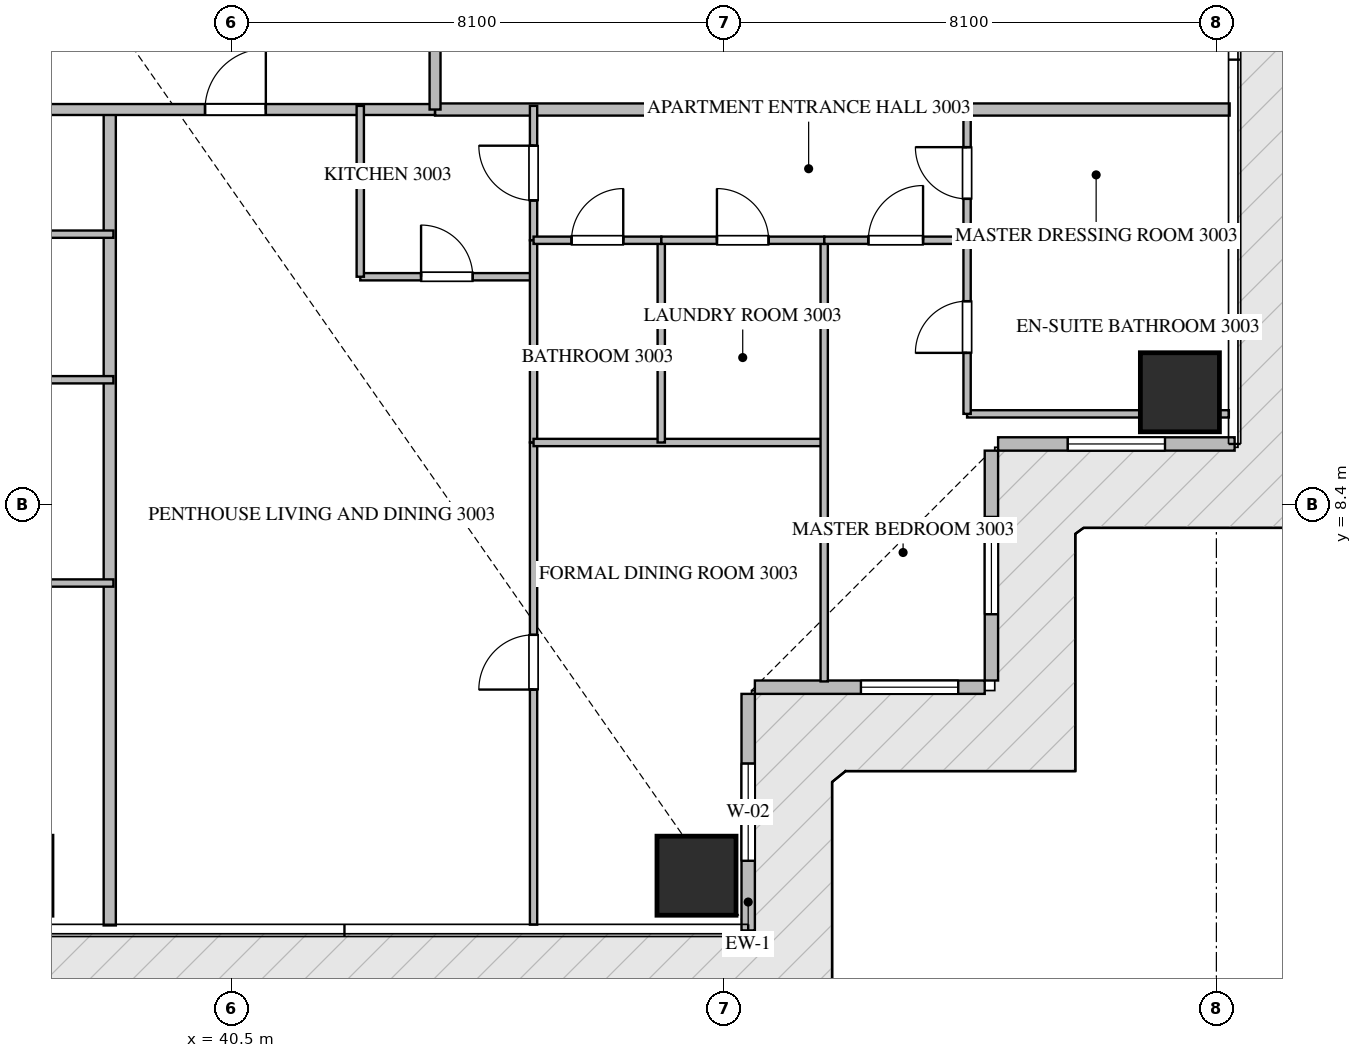
"""IFC4 building model, lengths in metres.
Left out: names, types, materials, properties, quantities, classifications, styles, units other than length and angle.
Written with IfcOpenShell. Run it as: python <this file> out.ifc"""

import sys

from ifc_helpers import new_model, si_unit, direction, frame, frame_2d, origin, origin_2d, place, context, subcontext, project, spatial, rectangle, extrude, source, transform, mapped, element, fill, save


model = new_model("IFC4")
c1 = context("Model", 3, precision=1e-05, world=origin(), true_north=direction((0.0, 1.0)))
c2 = subcontext(c1, "Body", "Model", "MODEL_VIEW")
j1 = project(units=[si_unit("LENGTHUNIT", "METRE"), si_unit("PLANEANGLEUNIT", "RADIAN")], contexts=[c1])
p1 = place(None, origin())
s1 = spatial("IfcSite", under=j1, at=p1, CompositionType="ELEMENT")
p2 = place(p1, origin())
s2 = spatial("IfcBuilding", under=s1, at=p2, CompositionType="ELEMENT")
p3 = place(p2, frame((0.0, 0.0, 123.9)))
s3 = spatial("IfcBuildingStorey", under=s2, at=p3, CompositionType="ELEMENT", Elevation=123.9)
m1 = source(origin(), c2, "Body", "SweptSolid", [
    extrude(rectangle(XDim=1.3, YDim=1.3, at=origin_2d()), origin(), (0.0, 0.0, 1.0), 3.75),
])
for number, where, z_axis, x_axis in (
    (1, (48.15, 2.3, -0.26), (0.0, 0.0, 1.0), (1.0, 0.0, 0.0)),
    (2, (56.1, 10.25, -0.26), (0.0, 0.0, 1.0), (1.0, 0.0, 0.0)),
):
    element("IfcColumn", number, at=place(p3, frame(where, z_axis=z_axis, x_axis=x_axis)), inside=s3, PredefinedType="COLUMN", context=c2, shape_type="MappedRepresentation", body=[
        mapped(m1, transform((0.0, 0.0, 0.0), scale=1.0)),
    ])
p4 = place(p3, frame((49.0, 1.4, 0.0), z_axis=(0.0, 0.0, 1.0), x_axis=(0.0, 1.0, 0.0)))
e3 = element("IfcWall", 3, at=p4, inside=s3, PredefinedType="ELEMENTEDWALL", context=c2, shape_type="SweptSolid", body=[
    extrude(rectangle(XDim=3.89, YDim=0.22, at=frame_2d((1.945, 0.0))), origin(), (0.0, 0.0, 1.0), 3.475),
])
p5 = place(p4, frame((1.145, 0.0, 0.65)))
e4 = element("IfcOpeningElement", 4, at=p5, cuts=e3, PredefinedType="OPENING", context=c2, shape_type="SweptSolid", body=[
    extrude(rectangle(XDim=1.6, YDim=2.1, at=frame_2d((0.8, 1.05))), frame((0.0, 0.12, 0.0), z_axis=(0.0, -1.0, 0.0), x_axis=(1.0, 0.0, 0.0)), (0.0, 0.0, 1.0), 0.24),
])
p6 = place(p3, frame((49.11, 5.4, 0.0), z_axis=(0.0, 0.0, 1.0), x_axis=(1.0, 0.0, 0.0)))
e5 = element("IfcWall", 5, at=p6, inside=s3, PredefinedType="ELEMENTEDWALL", context=c2, shape_type="SweptSolid", body=[
    extrude(rectangle(XDim=3.78, YDim=0.22, at=frame_2d((1.89, 0.0))), origin(), (0.0, 0.0, 1.0), 3.475),
])
p7 = place(p6, frame((1.744, 0.0, 0.65)))
e6 = element("IfcOpeningElement", 6, at=p7, cuts=e5, PredefinedType="OPENING", context=c2, shape_type="SweptSolid", body=[
    extrude(rectangle(XDim=1.6, YDim=2.1, at=frame_2d((0.8, 1.05))), frame((0.0, 0.12, 0.0), z_axis=(0.0, -1.0, 0.0), x_axis=(1.0, 0.0, 0.0)), (0.0, 0.0, 1.0), 0.24),
])
p8 = place(p3, frame((53.0, 5.51, 0.0), z_axis=(0.0, 0.0, 1.0), x_axis=(0.0, 1.0, 0.0)))
e7 = element("IfcWall", 7, at=p8, inside=s3, PredefinedType="ELEMENTEDWALL", context=c2, shape_type="SweptSolid", body=[
    extrude(rectangle(XDim=3.78, YDim=0.22, at=frame_2d((1.89, 0.0))), origin(), (0.0, 0.0, 1.0), 3.475),
])
p9 = place(p8, frame((1.09, 0.0, 0.65)))
e8 = element("IfcOpeningElement", 8, at=p9, cuts=e7, PredefinedType="OPENING", context=c2, shape_type="SweptSolid", body=[
    extrude(rectangle(XDim=1.6, YDim=2.1, at=frame_2d((0.8, 1.05))), frame((0.0, 0.12, 0.0), z_axis=(0.0, -1.0, 0.0), x_axis=(1.0, 0.0, 0.0)), (0.0, 0.0, 1.0), 0.24),
])
p10 = place(p3, frame((53.11, 9.4, 0.0), z_axis=(0.0, 0.0, 1.0), x_axis=(1.0, 0.0, 0.0)))
e9 = element("IfcWall", 9, at=p10, inside=s3, PredefinedType="ELEMENTEDWALL", context=c2, shape_type="SweptSolid", body=[
    extrude(rectangle(XDim=3.89, YDim=0.22, at=frame_2d((1.945, 0.0))), origin(), (0.0, 0.0, 1.0), 3.475),
])
p11 = place(p10, frame((1.145, 0.0, 0.65)))
e10 = element("IfcOpeningElement", 10, at=p11, cuts=e9, PredefinedType="OPENING", context=c2, shape_type="SweptSolid", body=[
    extrude(rectangle(XDim=1.6, YDim=2.1, at=frame_2d((0.8, 1.05))), frame((0.0, 0.12, 0.0), z_axis=(0.0, -1.0, 0.0), x_axis=(1.0, 0.0, 0.0)), (0.0, 0.0, 1.0), 0.24),
])
p12 = place(p3, frame((38.5, 1.482, 0.0), z_axis=(0.0, 0.0, 1.0), x_axis=(0.0, 1.0, 0.0)))
e11 = element("IfcWall", 11, at=p12, inside=s3, PredefinedType="PARTITIONING", context=c2, shape_type="SweptSolid", body=[
    extrude(rectangle(XDim=13.418, YDim=0.2, at=frame_2d((6.709, 0.0))), origin(), (0.0, 0.0, 1.0), 3.49),
])
p13 = place(p3, frame((43.85, 14.9, 0.0), z_axis=(0.0, 0.0, 1.0), x_axis=(1.0, 0.0, 0.0)))
e12 = element("IfcWall", 12, at=p13, inside=s3, PredefinedType="PARTITIONING", context=c2, shape_type="SweptSolid", body=[
    extrude(rectangle(XDim=13.068, YDim=0.2, at=frame_2d((6.534, 0.0))), origin(), (0.0, 0.0, 1.0), 3.49),
])
p14 = place(p3, frame((20.952, 14.9, 0.0), z_axis=(0.0, 0.0, 1.0), x_axis=(1.0, 0.0, 0.0)))
e13 = element("IfcWall", 13, at=p14, inside=s3, PredefinedType="PARTITIONING", context=c2, shape_type="SweptSolid", body=[
    extrude(rectangle(XDim=22.896, YDim=0.18, at=frame_2d((11.448, 0.0))), origin(), (0.0, 0.0, 1.0), 3.49),
])
p15 = place(p14, frame((2.781, 0.0, 0.0)))
e14 = element("IfcOpeningElement", 14, at=p15, cuts=e13, PredefinedType="OPENING", context=c2, shape_type="SweptSolid", body=[
    extrude(rectangle(XDim=1.0, YDim=2.15, at=frame_2d((0.5, 1.075))), frame((0.0, 0.1, 0.0), z_axis=(0.0, -1.0, 0.0), x_axis=(1.0, 0.0, 0.0)), (0.0, 0.0, 1.0), 0.2),
])
p16 = place(p14, frame((7.16, 0.0, 0.0)))
e15 = element("IfcOpeningElement", 15, at=p16, cuts=e13, PredefinedType="OPENING", context=c2, shape_type="SweptSolid", body=[
    extrude(rectangle(XDim=1.0, YDim=2.15, at=frame_2d((0.5, 1.075))), frame((0.0, 0.1, 0.0), z_axis=(0.0, -1.0, 0.0), x_axis=(1.0, 0.0, 0.0)), (0.0, 0.0, 1.0), 0.2),
])
p17 = place(p14, frame((19.115, 0.0, 0.0)))
e16 = element("IfcOpeningElement", 16, at=p17, cuts=e13, PredefinedType="OPENING", context=c2, shape_type="SweptSolid", body=[
    extrude(rectangle(XDim=1.0, YDim=2.15, at=frame_2d((0.5, 1.075))), frame((0.0, 0.1, 0.0), z_axis=(0.0, -1.0, 0.0), x_axis=(1.0, 0.0, 0.0)), (0.0, 0.0, 1.0), 0.2),
])
p18 = place(p3, frame((43.85, 14.9, 0.0), z_axis=(0.0, 0.0, 1.0), x_axis=(0.0, 1.0, 0.0)))
e17 = element("IfcWall", 17, at=p18, inside=s3, PredefinedType="PARTITIONING", context=c2, shape_type="SweptSolid", body=[
    extrude(rectangle(XDim=18.7, YDim=0.18, at=frame_2d((9.35, 0.0))), origin(), (0.0, 0.0, 1.0), 3.49),
])
p19 = place(p18, frame((1.805, 0.0, 0.0)))
e18 = element("IfcOpeningElement", 18, at=p19, cuts=e17, PredefinedType="OPENING", context=c2, shape_type="SweptSolid", body=[
    extrude(rectangle(XDim=1.0, YDim=2.15, at=frame_2d((0.5, 1.075))), frame((0.0, 0.1, 0.0), z_axis=(0.0, -1.0, 0.0), x_axis=(1.0, 0.0, 0.0)), (0.0, 0.0, 1.0), 0.2),
])
p20 = place(p18, frame((10.602, 0.0, 0.0)))
e19 = element("IfcOpeningElement", 19, at=p20, cuts=e17, PredefinedType="OPENING", context=c2, shape_type="SweptSolid", body=[
    extrude(rectangle(XDim=1.0, YDim=2.15, at=frame_2d((0.5, 1.075))), frame((0.0, 0.1, 0.0), z_axis=(0.0, -1.0, 0.0), x_axis=(1.0, 0.0, 0.0)), (0.0, 0.0, 1.0), 0.2),
])
p21 = place(p3, frame((30.94, 7.113, 0.0), z_axis=(0.0, 0.0, 1.0), x_axis=(1.0, 0.0, 0.0)))
e20 = element("IfcWall", 20, at=p21, inside=s3, PredefinedType="PARTITIONING", context=c2, shape_type="SweptSolid", body=[
    extrude(rectangle(XDim=7.62, YDim=0.12, at=frame_2d((3.81, 0.0))), origin(), (0.0, 0.0, 1.0), 3.49),
])
p22 = place(p3, frame((30.94, 10.456, 0.0), z_axis=(0.0, 0.0, 1.0), x_axis=(1.0, 0.0, 0.0)))
e21 = element("IfcWall", 21, at=p22, inside=s3, PredefinedType="PARTITIONING", context=c2, shape_type="SweptSolid", body=[
    extrude(rectangle(XDim=7.62, YDim=0.12, at=frame_2d((3.81, 0.0))), origin(), (0.0, 0.0, 1.0), 2.972),
])
p23 = place(p3, frame((30.94, 12.85, 0.0), z_axis=(0.0, 0.0, 1.0), x_axis=(1.0, 0.0, 0.0)))
e22 = element("IfcWall", 22, at=p23, inside=s3, PredefinedType="PARTITIONING", context=c2, shape_type="SweptSolid", body=[
    extrude(rectangle(XDim=7.62, YDim=0.12, at=frame_2d((3.81, 0.0))), origin(), (0.0, 0.0, 1.0), 3.49),
])
p24 = place(p3, frame((42.62, 12.15, 0.0), z_axis=(0.0, 0.0, 1.0), x_axis=(1.0, 0.0, 0.0)))
e23 = element("IfcWall", 23, at=p24, inside=s3, PredefinedType="PARTITIONING", context=c2, shape_type="SweptSolid", body=[
    extrude(rectangle(XDim=2.85, YDim=0.12, at=frame_2d((1.425, 0.0))), origin(), (0.0, 0.0, 1.0), 3.49),
])
p25 = place(p24, frame((1.0, 0.0, 0.0)))
e24 = element("IfcOpeningElement", 24, at=p25, cuts=e23, PredefinedType="OPENING", context=c2, shape_type="SweptSolid", body=[
    extrude(rectangle(XDim=0.85, YDim=2.1, at=frame_2d((0.425, 1.05))), frame((0.0, 0.07, 0.0), z_axis=(0.0, -1.0, 0.0), x_axis=(1.0, 0.0, 0.0)), (0.0, 0.0, 1.0), 0.14),
])
p26 = place(p3, frame((42.62, 12.15, 0.0), z_axis=(0.0, 0.0, 1.0), x_axis=(0.0, 1.0, 0.0)))
e25 = element("IfcWall", 25, at=p26, inside=s3, PredefinedType="PARTITIONING", context=c2, shape_type="SweptSolid", body=[
    extrude(rectangle(XDim=2.81, YDim=0.12, at=frame_2d((1.405, 0.0))), origin(), (0.0, 0.0, 1.0), 3.49),
])
p27 = place(p3, frame((45.47, 12.75, 0.0), z_axis=(0.0, 0.0, 1.0), x_axis=(0.0, 1.0, 0.0)))
e26 = element("IfcWall", 26, at=p27, inside=s3, PredefinedType="PARTITIONING", context=c2, shape_type="SweptSolid", body=[
    extrude(rectangle(XDim=2.21, YDim=0.12, at=frame_2d((1.105, 0.0))), origin(), (0.0, 0.0, 1.0), 3.49),
])
p28 = place(p27, frame((0.655, 0.0, 0.0)))
e27 = element("IfcOpeningElement", 27, at=p28, cuts=e26, PredefinedType="OPENING", context=c2, shape_type="SweptSolid", body=[
    extrude(rectangle(XDim=0.9, YDim=2.1, at=frame_2d((0.45, 1.05))), frame((0.0, 0.07, 0.0), z_axis=(0.0, -1.0, 0.0), x_axis=(1.0, 0.0, 0.0)), (0.0, 0.0, 1.0), 0.14),
])
p29 = place(p3, frame((45.47, 1.495, 0.0), z_axis=(0.0, 0.0, 1.0), x_axis=(0.0, 1.0, 0.0)))
e28 = element("IfcWall", 28, at=p29, inside=s3, PredefinedType="PARTITIONING", context=c2, shape_type="SweptSolid", body=[
    extrude(rectangle(XDim=7.929, YDim=0.12, at=frame_2d((3.964, 0.0))), origin(), (0.0, 0.0, 1.0), 3.49),
])
p30 = place(p29, frame((3.866, 0.0, 0.0)))
e29 = element("IfcOpeningElement", 29, at=p30, cuts=e28, PredefinedType="OPENING", context=c2, shape_type="SweptSolid", body=[
    extrude(rectangle(XDim=0.9, YDim=2.1, at=frame_2d((0.45, 1.05))), frame((0.0, 0.07, 0.0), z_axis=(0.0, -1.0, 0.0), x_axis=(1.0, 0.0, 0.0)), (0.0, 0.0, 1.0), 0.14),
])
p31 = place(p3, frame((45.47, 9.426, 0.0), z_axis=(0.0, 0.0, 1.0), x_axis=(0.0, 1.0, 0.0)))
e30 = element("IfcWall", 30, at=p31, inside=s3, PredefinedType="PARTITIONING", context=c2, shape_type="SweptSolid", body=[
    extrude(rectangle(XDim=3.322, YDim=0.12, at=frame_2d((1.661, 0.0))), origin(), (0.0, 0.0, 1.0), 3.49),
])
p32 = place(p3, frame((45.47, 9.424, 0.0), z_axis=(0.0, 0.0, 1.0), x_axis=(1.0, 0.0, 0.0)))
e31 = element("IfcWall", 31, at=p32, inside=s3, PredefinedType="PARTITIONING", context=c2, shape_type="SweptSolid", body=[
    extrude(rectangle(XDim=4.78, YDim=0.12, at=frame_2d((2.39, 0.0))), origin(), (0.0, 0.0, 1.0), 3.49),
])
p33 = place(p3, frame((50.25, 5.495, 0.0), z_axis=(0.0, 0.0, 1.0), x_axis=(0.0, 1.0, 0.0)))
e32 = element("IfcWall", 32, at=p33, inside=s3, PredefinedType="PARTITIONING", context=c2, shape_type="SweptSolid", body=[
    extrude(rectangle(XDim=7.255, YDim=0.12, at=frame_2d((3.627, 0.0))), origin(), (0.0, 0.0, 1.0), 3.49),
])
p34 = place(p3, frame((47.57, 9.424, 0.0), z_axis=(0.0, 0.0, 1.0), x_axis=(0.0, 1.0, 0.0)))
e33 = element("IfcWall", 33, at=p34, inside=s3, PredefinedType="PARTITIONING", context=c2, shape_type="SweptSolid", body=[
    extrude(rectangle(XDim=3.326, YDim=0.12, at=frame_2d((1.663, 0.0))), origin(), (0.0, 0.0, 1.0), 3.49),
])
p35 = place(p3, frame((45.47, 12.75, 0.0), z_axis=(0.0, 0.0, 1.0), x_axis=(1.0, 0.0, 0.0)))
e34 = element("IfcWall", 34, at=p35, inside=s3, PredefinedType="PARTITIONING", context=c2, shape_type="SweptSolid", body=[
    extrude(rectangle(XDim=2.1, YDim=0.12, at=frame_2d((1.05, 0.0))), origin(), (0.0, 0.0, 1.0), 3.49),
])
p36 = place(p35, frame((0.625, 0.0, 0.0)))
e35 = element("IfcOpeningElement", 35, at=p36, cuts=e34, PredefinedType="OPENING", context=c2, shape_type="SweptSolid", body=[
    extrude(rectangle(XDim=0.85, YDim=2.1, at=frame_2d((0.425, 1.05))), frame((0.0, 0.07, 0.0), z_axis=(0.0, -1.0, 0.0), x_axis=(1.0, 0.0, 0.0)), (0.0, 0.0, 1.0), 0.14),
])
p37 = place(p3, frame((47.572, 12.75, 0.0), z_axis=(0.0, 0.0, 1.0), x_axis=(1.0, 0.0, 0.0)))
e36 = element("IfcWall", 36, at=p37, inside=s3, PredefinedType="PARTITIONING", context=c2, shape_type="SweptSolid", body=[
    extrude(rectangle(XDim=2.678, YDim=0.12, at=frame_2d((1.339, 0.0))), origin(), (0.0, 0.0, 1.0), 3.49),
])
p38 = place(p37, frame((0.914, 0.0, 0.0)))
e37 = element("IfcOpeningElement", 37, at=p38, cuts=e36, PredefinedType="OPENING", context=c2, shape_type="SweptSolid", body=[
    extrude(rectangle(XDim=0.85, YDim=2.1, at=frame_2d((0.425, 1.05))), frame((0.0, 0.07, 0.0), z_axis=(0.0, -1.0, 0.0), x_axis=(1.0, 0.0, 0.0)), (0.0, 0.0, 1.0), 0.14),
])
p39 = place(p3, frame((50.252, 12.75, 0.0), z_axis=(0.0, 0.0, 1.0), x_axis=(1.0, 0.0, 0.0)))
e38 = element("IfcWall", 38, at=p39, inside=s3, PredefinedType="PARTITIONING", context=c2, shape_type="SweptSolid", body=[
    extrude(rectangle(XDim=2.348, YDim=0.12, at=frame_2d((1.174, 0.0))), origin(), (0.0, 0.0, 1.0), 3.49),
])
p40 = place(p39, frame((0.724, 0.0, 0.0)))
e39 = element("IfcOpeningElement", 39, at=p40, cuts=e38, PredefinedType="OPENING", context=c2, shape_type="SweptSolid", body=[
    extrude(rectangle(XDim=0.9, YDim=2.1, at=frame_2d((0.45, 1.05))), frame((0.0, 0.07, 0.0), z_axis=(0.0, -1.0, 0.0), x_axis=(1.0, 0.0, 0.0)), (0.0, 0.0, 1.0), 0.14),
])
p41 = place(p3, frame((52.6, 9.895, 0.0), z_axis=(0.0, 0.0, 1.0), x_axis=(1.0, 0.0, 0.0)))
e40 = element("IfcWall", 40, at=p41, inside=s3, PredefinedType="PARTITIONING", context=c2, shape_type="SweptSolid", body=[
    extrude(rectangle(XDim=4.305, YDim=0.12, at=frame_2d((2.152, 0.0))), origin(), (0.0, 0.0, 1.0), 3.49),
])
p42 = place(p3, frame((52.602, 12.75, 0.0), z_axis=(0.0, 0.0, 1.0), x_axis=(1.0, 0.0, 0.0)))
e41 = element("IfcWall", 41, at=p42, inside=s3, PredefinedType="PARTITIONING", context=c2, shape_type="SweptSolid", body=[
    extrude(rectangle(XDim=4.303, YDim=0.12, at=frame_2d((2.151, 0.0))), origin(), (0.0, 0.0, 1.0), 3.49),
])
p43 = place(p3, frame((52.6, 9.895, 0.0), z_axis=(0.0, 0.0, 1.0), x_axis=(0.0, 1.0, 0.0)))
e42 = element("IfcWall", 42, at=p43, inside=s3, PredefinedType="PARTITIONING", context=c2, shape_type="SweptSolid", body=[
    extrude(rectangle(XDim=2.855, YDim=0.12, at=frame_2d((1.427, 0.0))), origin(), (0.0, 0.0, 1.0), 3.49),
])
p44 = place(p43, frame((1.003, 0.0, 0.0)))
e43 = element("IfcOpeningElement", 43, at=p44, cuts=e42, PredefinedType="OPENING", context=c2, shape_type="SweptSolid", body=[
    extrude(rectangle(XDim=0.85, YDim=2.1, at=frame_2d((0.425, 1.05))), frame((0.0, 0.07, 0.0), z_axis=(0.0, -1.0, 0.0), x_axis=(1.0, 0.0, 0.0)), (0.0, 0.0, 1.0), 0.14),
])
p45 = place(p3, frame((52.6, 12.752, 0.0), z_axis=(0.0, 0.0, 1.0), x_axis=(0.0, 1.0, 0.0)))
e44 = element("IfcWall", 44, at=p45, inside=s3, PredefinedType="PARTITIONING", context=c2, shape_type="SweptSolid", body=[
    extrude(rectangle(XDim=2.208, YDim=0.12, at=frame_2d((1.104, 0.0))), origin(), (0.0, 0.0, 1.0), 3.49),
])
p46 = place(p45, frame((0.679, 0.0, 0.0)))
e45 = element("IfcOpeningElement", 45, at=p46, cuts=e44, PredefinedType="OPENING", context=c2, shape_type="SweptSolid", body=[
    extrude(rectangle(XDim=0.85, YDim=2.1, at=frame_2d((0.425, 1.05))), frame((0.0, 0.07, 0.0), z_axis=(0.0, -1.0, 0.0), x_axis=(1.0, 0.0, 0.0)), (0.0, 0.0, 1.0), 0.14),
])
m2 = source(origin(), c2, "Body", "SweptSolid", [
    extrude(rectangle(XDim=1.6, YDim=2.1, at=frame_2d((0.8, 1.05))), frame((0.0, 0.03, 0.0), z_axis=(0.0, -1.0, 0.0), x_axis=(1.0, 0.0, 0.0)), (0.0, 0.0, 1.0), 0.06),
])
p47 = place(p5, origin())
e46 = element("IfcWindow", 46, at=p47, inside=s3, PartitioningType="SINGLE_PANEL", PredefinedType="WINDOW", context=c2, shape_type="MappedRepresentation", body=[
    mapped(m2, transform((0.0, 0.0, 0.0), scale=1.0)),
])
fill(e4, e46)
p48 = place(p7, origin())
e47 = element("IfcWindow", 47, at=p48, inside=s3, PartitioningType="SINGLE_PANEL", PredefinedType="WINDOW", context=c2, shape_type="MappedRepresentation", body=[
    mapped(m2, transform((0.0, 0.0, 0.0), scale=1.0)),
])
fill(e6, e47)
p49 = place(p9, origin())
e48 = element("IfcWindow", 48, at=p49, inside=s3, PartitioningType="SINGLE_PANEL", PredefinedType="WINDOW", context=c2, shape_type="MappedRepresentation", body=[
    mapped(m2, transform((0.0, 0.0, 0.0), scale=1.0)),
])
fill(e8, e48)
p50 = place(p11, origin())
e49 = element("IfcWindow", 49, at=p50, inside=s3, PartitioningType="SINGLE_PANEL", PredefinedType="WINDOW", context=c2, shape_type="MappedRepresentation", body=[
    mapped(m2, transform((0.0, 0.0, 0.0), scale=1.0)),
])
fill(e10, e49)
m3 = source(origin(), c2, "Body", "SweptSolid", [
    extrude(rectangle(XDim=1.0, YDim=2.15, at=frame_2d((0.5, 1.075))), frame((0.0, 0.025, 0.0), z_axis=(0.0, -1.0, 0.0), x_axis=(1.0, 0.0, 0.0)), (0.0, 0.0, 1.0), 0.05),
])
p51 = place(p17, origin())
e50 = element("IfcDoor", 50, at=p51, inside=s3, OperationType="SINGLE_SWING_RIGHT", PredefinedType="DOOR", context=c2, shape_type="MappedRepresentation", body=[
    mapped(m3, transform((0.0, 0.0, 0.0), scale=1.0)),
])
fill(e16, e50)
m4 = source(origin(), c2, "Body", "SweptSolid", [
    extrude(rectangle(XDim=0.85, YDim=2.1, at=frame_2d((0.425, 1.05))), frame((0.0, 0.025, 0.0), z_axis=(0.0, -1.0, 0.0), x_axis=(1.0, 0.0, 0.0)), (0.0, 0.0, 1.0), 0.05),
])
p52 = place(p25, origin())
e51 = element("IfcDoor", 51, at=p52, inside=s3, OperationType="SINGLE_SWING_LEFT", PredefinedType="DOOR", context=c2, shape_type="MappedRepresentation", body=[
    mapped(m4, transform((0.0, 0.0, 0.0), scale=1.0)),
])
fill(e24, e51)
m5 = source(origin(), c2, "Body", "SweptSolid", [
    extrude(rectangle(XDim=0.9, YDim=2.1, at=frame_2d((0.45, 1.05))), frame((0.0, 0.025, 0.0), z_axis=(0.0, -1.0, 0.0), x_axis=(1.0, 0.0, 0.0)), (0.0, 0.0, 1.0), 0.05),
])
p53 = place(p28, origin())
e52 = element("IfcDoor", 52, at=p53, inside=s3, OperationType="SINGLE_SWING_RIGHT", PredefinedType="DOOR", context=c2, shape_type="MappedRepresentation", body=[
    mapped(m5, transform((0.0, 0.0, 0.0), scale=1.0)),
])
fill(e27, e52)
p54 = place(p30, origin())
e53 = element("IfcDoor", 53, at=p54, inside=s3, OperationType="SINGLE_SWING_LEFT", PredefinedType="DOOR", context=c2, shape_type="MappedRepresentation", body=[
    mapped(m5, transform((0.0, 0.0, 0.0), scale=1.0)),
])
fill(e29, e53)
p55 = place(p36, origin())
e54 = element("IfcDoor", 54, at=p55, inside=s3, OperationType="SINGLE_SWING_RIGHT", PredefinedType="DOOR", context=c2, shape_type="MappedRepresentation", body=[
    mapped(m4, transform((0.0, 0.0, 0.0), scale=1.0)),
])
fill(e35, e54)
p56 = place(p38, origin())
e55 = element("IfcDoor", 55, at=p56, inside=s3, OperationType="SINGLE_SWING_LEFT", PredefinedType="DOOR", context=c2, shape_type="MappedRepresentation", body=[
    mapped(m4, transform((0.0, 0.0, 0.0), scale=1.0)),
])
fill(e37, e55)
p57 = place(p40, origin())
e56 = element("IfcDoor", 56, at=p57, inside=s3, OperationType="SINGLE_SWING_RIGHT", PredefinedType="DOOR", context=c2, shape_type="MappedRepresentation", body=[
    mapped(m5, transform((0.0, 0.0, 0.0), scale=1.0)),
])
fill(e39, e56)
p58 = place(p44, origin())
e57 = element("IfcDoor", 57, at=p58, inside=s3, OperationType="SINGLE_SWING_LEFT", PredefinedType="DOOR", context=c2, shape_type="MappedRepresentation", body=[
    mapped(m4, transform((0.0, 0.0, 0.0), scale=1.0)),
])
fill(e43, e57)
p59 = place(p46, origin())
e58 = element("IfcDoor", 58, at=p59, inside=s3, OperationType="SINGLE_SWING_RIGHT", PredefinedType="DOOR", context=c2, shape_type="MappedRepresentation", body=[
    mapped(m4, transform((0.0, 0.0, 0.0), scale=1.0)),
])
fill(e45, e58)
save(model, sys.argv[1])
